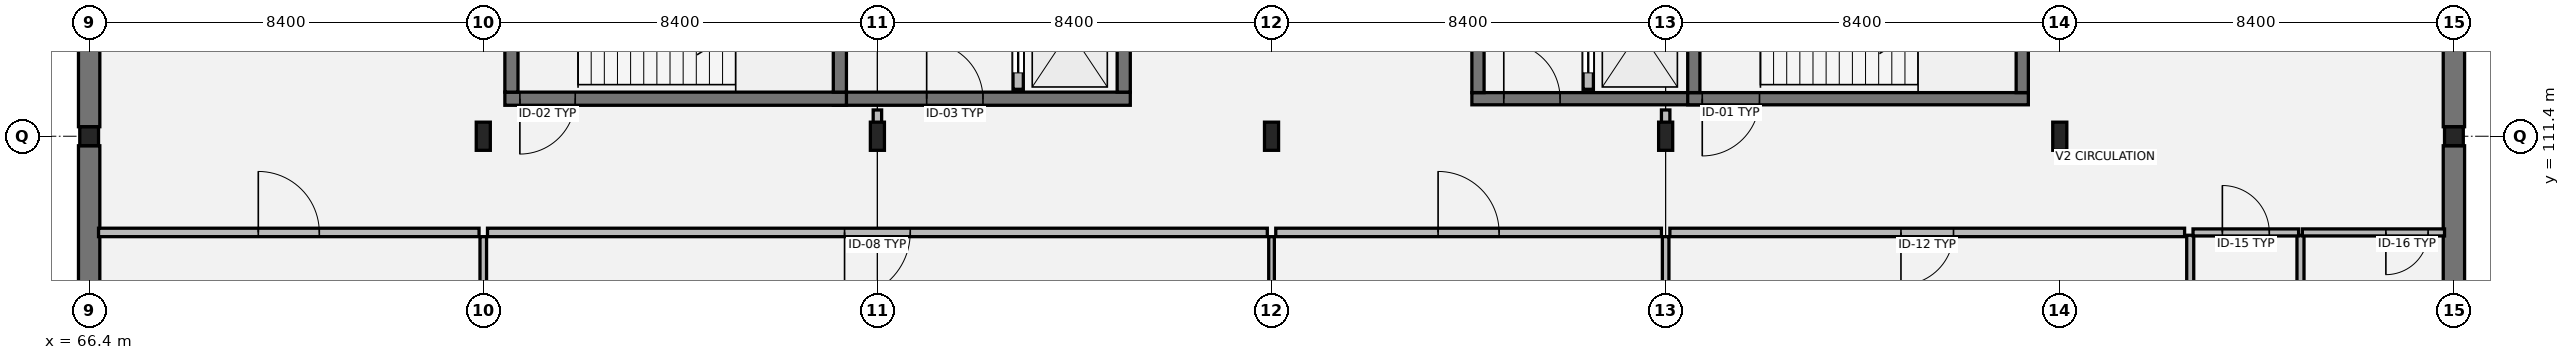
"""IFC4 building model, lengths in metres.
Left out: names, types, materials, properties, quantities, classifications, styles, units other than length and angle.
Written with IfcOpenShell. Run it as: python <this file> out.ifc"""

import sys

from ifc_helpers import new_model, si_unit, direction, frame, frame_2d, origin, origin_2d, place, context, subcontext, project, spatial, rectangle, hollow_rectangle, i_section, extrude, element, fill, save


model = new_model("IFC4")
c1 = context("Model", 3, precision=1e-05, world=origin(), true_north=direction((0.0, 1.0)))
c2 = subcontext(c1, "Body", "Model", "MODEL_VIEW")
j1 = project(units=[si_unit("LENGTHUNIT", "METRE"), si_unit("PLANEANGLEUNIT", "RADIAN")], contexts=[c1])
p1 = place(None, origin())
s1 = spatial("IfcSite", under=j1, at=p1, CompositionType="ELEMENT")
p2 = place(p1, origin())
s2 = spatial("IfcBuilding", under=s1, at=p2, CompositionType="ELEMENT")
p3 = place(p2, frame((0.0, 0.0, -4.42)))
s3 = spatial("IfcBuildingStorey", under=s2, at=p3, CompositionType="ELEMENT", Elevation=-4.42)
p4 = place(p3, frame((66.4, 111.4, 0.0), z_axis=(0.0, 0.0, 1.0), x_axis=(1.0, 0.0, 0.0)))
e1 = element("IfcColumn", 1, at=p4, inside=s3, PredefinedType="COLUMN", context=c2, shape_type="SweptSolid", body=[
    extrude(hollow_rectangle(XDim=0.4, YDim=0.4, WallThickness=0.016, at=origin_2d()), origin(), (0.0, 0.0, 1.0), 4.395),
])
for number, where, z_axis, x_axis in (
    (2, (74.8, 111.4, 0.0), (0.0, 0.0, 1.0), (1.0, 0.0, 0.0)),
    (3, (83.2, 111.4, 0.0), (0.0, 0.0, 1.0), (1.0, 0.0, 0.0)),
    (4, (91.6, 111.4, 0.0), (0.0, 0.0, 1.0), (1.0, 0.0, 0.0)),
    (5, (100.0, 111.4, 0.0), (0.0, 0.0, 1.0), (1.0, 0.0, 0.0)),
    (6, (108.4, 111.4, 0.0), (0.0, 0.0, 1.0), (1.0, 0.0, 0.0)),
):
    element("IfcColumn", number, at=place(p3, frame(where, z_axis=z_axis, x_axis=x_axis)), inside=s3, PredefinedType="COLUMN", context=c2, shape_type="SweptSolid", body=[
        extrude(i_section(OverallWidth=0.3, OverallDepth=0.6, WebThickness=0.015, FlangeThickness=0.03, at=origin_2d()), origin(), (0.0, 0.0, 1.0), 4.395),
    ])
p5 = place(p3, frame((116.8, 111.4, 0.0), z_axis=(0.0, 0.0, 1.0), x_axis=(1.0, 0.0, 0.0)))
e7 = element("IfcColumn", 7, at=p5, inside=s3, PredefinedType="COLUMN", context=c2, shape_type="SweptSolid", body=[
    extrude(hollow_rectangle(XDim=0.4, YDim=0.4, WallThickness=0.016, at=origin_2d()), origin(), (0.0, 0.0, 1.0), 4.395),
])
for number, where, z_axis, x_axis in (
    (8, (66.4, 104.003, 0.0), (0.0, 0.0, 1.0), (0.0, 1.0, 0.0)),
    (9, (116.8, 104.003, 0.0), (0.0, 0.0, 1.0), (0.0, 1.0, 0.0)),
    (10, (66.4, 111.603, 0.0), (0.0, 0.0, 1.0), (0.0, 1.0, 0.0)),
    (11, (116.8, 111.603, 0.0), (0.0, 0.0, 1.0), (0.0, 1.0, 0.0)),
):
    element("IfcWall", number, at=place(p3, frame(where, z_axis=z_axis, x_axis=x_axis)), inside=s3, PredefinedType="USERDEFINED", context=c2, shape_type="SweptSolid", body=[
        extrude(rectangle(XDim=7.194, YDim=0.455, at=frame_2d((3.597, 0.0))), origin(), (0.0, 0.0, 1.0), 3.82),
    ])
p6 = place(p3, frame((82.26, 112.2, 0.0), z_axis=(0.0, 0.0, 1.0), x_axis=(1.0, 0.0, 0.0)))
e12 = element("IfcWall", 12, at=p6, inside=s3, PredefinedType="SHEAR", context=c2, shape_type="SweptSolid", body=[
    extrude(rectangle(XDim=6.33, YDim=0.28, at=frame_2d((3.165, 0.0))), origin(), (0.0, 0.0, 1.0), 4.185),
])
p7 = place(p6, frame((1.99, 0.0, 0.0)))
e13 = element("IfcOpeningElement", 13, at=p7, cuts=e12, PredefinedType="OPENING", context=c2, shape_type="SweptSolid", body=[
    extrude(rectangle(XDim=1.2, YDim=2.16, at=frame_2d((0.6, 1.08))), frame((0.0, 0.15, 0.0), z_axis=(0.0, -1.0, 0.0), x_axis=(1.0, 0.0, 0.0)), (0.0, 0.0, 1.0), 0.3),
])
p8 = place(p3, frame((88.45, 112.34, 0.0), z_axis=(0.0, 0.0, 1.0), x_axis=(0.0, 1.0, 0.0)))
e14 = element("IfcWall", 14, at=p8, inside=s3, PredefinedType="SHEAR", context=c2, shape_type="SweptSolid", body=[
    extrude(rectangle(XDim=5.72, YDim=0.28, at=frame_2d((2.86, 0.0))), origin(), (0.0, 0.0, 1.0), 4.185),
])
p9 = place(p3, frame((86.2, 112.4, 0.0), z_axis=(0.0, 0.0, 1.0), x_axis=(0.0, 1.0, 0.0)))
e15 = element("IfcWall", 15, at=p9, inside=s3, PredefinedType="SOLIDWALL", context=c2, shape_type="SweptSolid", body=[
    extrude(rectangle(XDim=5.6, YDim=0.22, at=frame_2d((2.8, 0.0))), origin(), (0.0, 0.0, 1.0), 4.185),
])
p10 = place(p9, frame((0.35, 0.0, 0.0)))
e16 = element("IfcOpeningElement", 16, at=p10, cuts=e15, PredefinedType="OPENING", context=c2, shape_type="SweptSolid", body=[
    extrude(rectangle(XDim=1.1, YDim=2.15, at=frame_2d((0.55, 1.075))), frame((0.0, 0.12, 0.0), z_axis=(0.0, -1.0, 0.0), x_axis=(1.0, 0.0, 0.0)), (0.0, 0.0, 1.0), 0.24),
])
p11 = place(p9, frame((2.4, 0.0, 0.0)))
e17 = element("IfcOpeningElement", 17, at=p11, cuts=e15, PredefinedType="OPENING", context=c2, shape_type="SweptSolid", body=[
    extrude(rectangle(XDim=1.1, YDim=2.15, at=frame_2d((0.55, 1.075))), frame((0.0, 0.12, 0.0), z_axis=(0.0, -1.0, 0.0), x_axis=(1.0, 0.0, 0.0)), (0.0, 0.0, 1.0), 0.24),
])
p12 = place(p3, frame((75.26, 112.2, 0.0), z_axis=(0.0, 0.0, 1.0), x_axis=(1.0, 0.0, 0.0)))
e18 = element("IfcWall", 18, at=p12, inside=s3, PredefinedType="SHEAR", context=c2, shape_type="SweptSolid", body=[
    extrude(rectangle(XDim=7.28, YDim=0.28, at=frame_2d((3.64, 0.0))), origin(), (0.0, 0.0, 1.0), 4.185),
])
p13 = place(p12, frame((0.32, 0.0, 0.0)))
e19 = element("IfcOpeningElement", 19, at=p13, cuts=e18, PredefinedType="OPENING", context=c2, shape_type="SweptSolid", body=[
    extrude(rectangle(XDim=1.18, YDim=2.18, at=frame_2d((0.59, 1.09))), frame((0.0, 0.15, 0.0), z_axis=(0.0, -1.0, 0.0), x_axis=(1.0, 0.0, 0.0)), (0.0, 0.0, 1.0), 0.3),
])
for number, where, z_axis, x_axis in (
    (20, (75.4, 112.34, 0.0), (0.0, 0.0, 1.0), (0.0, 1.0, 0.0)),
    (21, (82.4, 112.34, 0.0), (0.0, 0.0, 1.0), (0.0, 1.0, 0.0)),
):
    element("IfcWall", number, at=place(p3, frame(where, z_axis=z_axis, x_axis=x_axis)), inside=s3, PredefinedType="SHEAR", context=c2, shape_type="SweptSolid", body=[
        extrude(rectangle(XDim=5.72, YDim=0.28, at=frame_2d((2.86, 0.0))), origin(), (0.0, 0.0, 1.0), 4.185),
    ])
p14 = place(p3, frame((95.87, 112.2, 0.0), z_axis=(0.0, 0.0, 1.0), x_axis=(1.0, 0.0, 0.0)))
e22 = element("IfcWall", 22, at=p14, inside=s3, PredefinedType="SHEAR", context=c2, shape_type="SweptSolid", body=[
    extrude(rectangle(XDim=4.86, YDim=0.26, at=frame_2d((2.43, 0.0))), origin(), (0.0, 0.0, 1.0), 4.185),
])
p15 = place(p14, frame((0.68, 0.0, 0.0)))
e23 = element("IfcOpeningElement", 23, at=p15, cuts=e22, PredefinedType="OPENING", context=c2, shape_type="SweptSolid", body=[
    extrude(rectangle(XDim=1.2, YDim=2.16, at=frame_2d((0.6, 1.08))), frame((0.0, 0.14, 0.0), z_axis=(0.0, -1.0, 0.0), x_axis=(1.0, 0.0, 0.0)), (0.0, 0.0, 1.0), 0.28),
])
p16 = place(p3, frame((96.0, 118.07, 0.0), z_axis=(0.0, 0.0, 1.0), x_axis=(0.0, -1.0, 0.0)))
e24 = element("IfcWall", 24, at=p16, inside=s3, PredefinedType="SHEAR", context=c2, shape_type="SweptSolid", body=[
    extrude(rectangle(XDim=5.74, YDim=0.26, at=frame_2d((2.87, 0.0))), origin(), (0.0, 0.0, 1.0), 4.185),
])
p17 = place(p3, frame((98.35, 112.4, 0.0), z_axis=(0.0, 0.0, 1.0), x_axis=(0.0, 1.0, 0.0)))
e25 = element("IfcWall", 25, at=p17, inside=s3, PredefinedType="SOLIDWALL", context=c2, shape_type="SweptSolid", body=[
    extrude(rectangle(XDim=5.6, YDim=0.22, at=frame_2d((2.8, 0.0))), origin(), (0.0, 0.0, 1.0), 4.185),
])
p18 = place(p17, frame((0.35, 0.0, 0.0)))
e26 = element("IfcOpeningElement", 26, at=p18, cuts=e25, PredefinedType="OPENING", context=c2, shape_type="SweptSolid", body=[
    extrude(rectangle(XDim=1.1, YDim=2.15, at=frame_2d((0.55, 1.075))), frame((0.0, 0.12, 0.0), z_axis=(0.0, -1.0, 0.0), x_axis=(1.0, 0.0, 0.0)), (0.0, 0.0, 1.0), 0.24),
])
p19 = place(p3, frame((100.47, 112.2, 0.0), z_axis=(0.0, 0.0, 1.0), x_axis=(1.0, 0.0, 0.0)))
e27 = element("IfcWall", 27, at=p19, inside=s3, PredefinedType="SHEAR", context=c2, shape_type="SweptSolid", body=[
    extrude(rectangle(XDim=7.26, YDim=0.26, at=frame_2d((3.63, 0.0))), origin(), (0.0, 0.0, 1.0), 4.185),
])
p20 = place(p19, frame((0.31, 0.0, 0.0)))
e28 = element("IfcOpeningElement", 28, at=p20, cuts=e27, PredefinedType="OPENING", context=c2, shape_type="SweptSolid", body=[
    extrude(rectangle(XDim=1.22, YDim=2.18, at=frame_2d((0.61, 1.09))), frame((0.0, 0.14, 0.0), z_axis=(0.0, -1.0, 0.0), x_axis=(1.0, 0.0, 0.0)), (0.0, 0.0, 1.0), 0.28),
])
for number, where, z_axis, x_axis in (
    (29, (100.6, 112.33, 0.0), (0.0, 0.0, 1.0), (0.0, 1.0, 0.0)),
    (30, (107.6, 112.33, 0.0), (0.0, 0.0, 1.0), (0.0, 1.0, 0.0)),
):
    element("IfcWall", number, at=place(p3, frame(where, z_axis=z_axis, x_axis=x_axis)), inside=s3, PredefinedType="SHEAR", context=c2, shape_type="SweptSolid", body=[
        extrude(rectangle(XDim=5.74, YDim=0.26, at=frame_2d((2.87, 0.0))), origin(), (0.0, 0.0, 1.0), 4.185),
    ])
for number, where, z_axis, x_axis in (
    (31, (111.18, 106.93, 0.0), (0.0, 0.0, 1.0), (0.0, 1.0, 0.0)),
    (32, (113.53, 106.93, 0.0), (0.0, 0.0, 1.0), (0.0, 1.0, 0.0)),
):
    element("IfcWall", number, at=place(p3, frame(where, z_axis=z_axis, x_axis=x_axis)), inside=s3, PredefinedType="PARTITIONING", context=c2, shape_type="SweptSolid", body=[
        extrude(rectangle(XDim=2.36, YDim=0.15, at=frame_2d((1.18, 0.0))), origin(), (0.0, 0.0, 1.0), 3.52),
    ])
p21 = place(p3, frame((111.24, 109.35, 0.0), z_axis=(0.0, 0.0, 1.0), x_axis=(1.0, 0.0, 0.0)))
e33 = element("IfcWall", 33, at=p21, inside=s3, PredefinedType="PARTITIONING", context=c2, shape_type="SweptSolid", body=[
    extrude(rectangle(XDim=2.25, YDim=0.15, at=frame_2d((1.125, 0.0))), origin(), (0.0, 0.0, 1.0), 3.52),
])
p22 = place(p21, frame((0.625, 0.0, 0.0)))
e34 = element("IfcOpeningElement", 34, at=p22, cuts=e33, PredefinedType="OPENING", context=c2, shape_type="SweptSolid", body=[
    extrude(rectangle(XDim=1.0, YDim=2.15, at=frame_2d((0.5, 1.075))), frame((0.0, 0.085, 0.0), z_axis=(0.0, -1.0, 0.0), x_axis=(1.0, 0.0, 0.0)), (0.0, 0.0, 1.0), 0.17),
])
p23 = place(p3, frame((113.57, 109.35, 0.0), z_axis=(0.0, 0.0, 1.0), x_axis=(1.0, 0.0, 0.0)))
e35 = element("IfcWall", 35, at=p23, inside=s3, PredefinedType="PARTITIONING", context=c2, shape_type="SweptSolid", body=[
    extrude(rectangle(XDim=3.03, YDim=0.15, at=frame_2d((1.515, 0.0))), origin(), (0.0, 0.0, 1.0), 3.52),
])
p24 = place(p23, frame((1.78, 0.0, 0.0)))
e36 = element("IfcOpeningElement", 36, at=p24, cuts=e35, PredefinedType="OPENING", context=c2, shape_type="SweptSolid", body=[
    extrude(rectangle(XDim=0.9, YDim=2.15, at=frame_2d((0.45, 1.075))), frame((0.0, 0.085, 0.0), z_axis=(0.0, -1.0, 0.0), x_axis=(1.0, 0.0, 0.0)), (0.0, 0.0, 1.0), 0.17),
])
p25 = place(p3, frame((66.6, 109.35, 0.0), z_axis=(0.0, 0.0, 1.0), x_axis=(1.0, 0.0, 0.0)))
e37 = element("IfcWall", 37, at=p25, inside=s3, PredefinedType="PARTITIONING", context=c2, shape_type="SweptSolid", body=[
    extrude(rectangle(XDim=8.11, YDim=0.18, at=frame_2d((4.055, 0.0))), origin(), (0.0, 0.0, 1.0), 3.52),
])
p26 = place(p25, frame((3.405, 0.0, 0.0)))
e38 = element("IfcOpeningElement", 38, at=p26, cuts=e37, PredefinedType="OPENING", context=c2, shape_type="SweptSolid", body=[
    extrude(rectangle(XDim=1.3, YDim=2.2, at=frame_2d((0.65, 1.1))), frame((0.0, 0.1, 0.0), z_axis=(0.0, -1.0, 0.0), x_axis=(1.0, 0.0, 0.0)), (0.0, 0.0, 1.0), 0.2),
])
p27 = place(p3, frame((74.89, 109.35, 0.0), z_axis=(0.0, 0.0, 1.0), x_axis=(1.0, 0.0, 0.0)))
e39 = element("IfcWall", 39, at=p27, inside=s3, PredefinedType="PARTITIONING", context=c2, shape_type="SweptSolid", body=[
    extrude(rectangle(XDim=16.62, YDim=0.18, at=frame_2d((8.31, 0.0))), origin(), (0.0, 0.0, 1.0), 3.52),
])
p28 = place(p27, frame((7.61, 0.0, 0.0)))
e40 = element("IfcOpeningElement", 40, at=p28, cuts=e39, PredefinedType="OPENING", context=c2, shape_type="SweptSolid", body=[
    extrude(rectangle(XDim=1.4, YDim=2.22, at=frame_2d((0.7, 1.11))), frame((0.0, 0.1, 0.0), z_axis=(0.0, -1.0, 0.0), x_axis=(1.0, 0.0, 0.0)), (0.0, 0.0, 1.0), 0.2),
])
p29 = place(p3, frame((91.69, 109.35, 0.0), z_axis=(0.0, 0.0, 1.0), x_axis=(1.0, 0.0, 0.0)))
e41 = element("IfcWall", 41, at=p29, inside=s3, PredefinedType="PARTITIONING", context=c2, shape_type="SweptSolid", body=[
    extrude(rectangle(XDim=8.22, YDim=0.18, at=frame_2d((4.11, 0.0))), origin(), (0.0, 0.0, 1.0), 3.52),
])
p30 = place(p29, frame((3.46, 0.0, 0.0)))
e42 = element("IfcOpeningElement", 42, at=p30, cuts=e41, PredefinedType="OPENING", context=c2, shape_type="SweptSolid", body=[
    extrude(rectangle(XDim=1.3, YDim=2.2, at=frame_2d((0.65, 1.1))), frame((0.0, 0.1, 0.0), z_axis=(0.0, -1.0, 0.0), x_axis=(1.0, 0.0, 0.0)), (0.0, 0.0, 1.0), 0.2),
])
p31 = place(p3, frame((100.09, 109.35, 0.0), z_axis=(0.0, 0.0, 1.0), x_axis=(1.0, 0.0, 0.0)))
e43 = element("IfcWall", 43, at=p31, inside=s3, PredefinedType="PARTITIONING", context=c2, shape_type="SweptSolid", body=[
    extrude(rectangle(XDim=10.97, YDim=0.18, at=frame_2d((5.485, 0.0))), origin(), (0.0, 0.0, 1.0), 3.52),
])
p32 = place(p31, frame((4.925, 0.0, 0.0)))
e44 = element("IfcOpeningElement", 44, at=p32, cuts=e43, PredefinedType="OPENING", context=c2, shape_type="SweptSolid", body=[
    extrude(rectangle(XDim=1.12, YDim=2.15, at=frame_2d((0.56, 1.075))), frame((0.0, 0.1, 0.0), z_axis=(0.0, -1.0, 0.0), x_axis=(1.0, 0.0, 0.0)), (0.0, 0.0, 1.0), 0.2),
])
for number, where, z_axis, x_axis in (
    (45, (83.2, 111.64, 0.0), (0.0, 0.0, 1.0), (0.0, 1.0, 0.0)),
    (46, (100.0, 111.64, 0.0), (0.0, 0.0, 1.0), (0.0, 1.0, 0.0)),
):
    element("IfcWall", number, at=place(p3, frame(where, z_axis=z_axis, x_axis=x_axis)), inside=s3, PredefinedType="PARTITIONING", context=c2, shape_type="SweptSolid", body=[
        extrude(rectangle(XDim=0.32, YDim=0.18, at=frame_2d((0.16, 0.0))), origin(), (0.0, 0.0, 1.0), 3.52),
    ])
p33 = place(p3, frame((74.8, 81.32, 0.0), z_axis=(0.0, 0.0, 1.0), x_axis=(0.0, 1.0, 0.0)))
e47 = element("IfcWall", 47, at=p33, inside=s3, PredefinedType="PARTITIONING", context=c2, shape_type="SweptSolid", body=[
    extrude(rectangle(XDim=27.94, YDim=0.14, at=frame_2d((13.97, 0.0))), origin(), (0.0, 0.0, 1.0), 3.52),
])
p34 = place(p3, frame((91.6, 81.32, 0.0), z_axis=(0.0, 0.0, 1.0), x_axis=(0.0, 1.0, 0.0)))
e48 = element("IfcWall", 48, at=p34, inside=s3, PredefinedType="PARTITIONING", context=c2, shape_type="SweptSolid", body=[
    extrude(rectangle(XDim=27.94, YDim=0.12, at=frame_2d((13.97, 0.0))), origin(), (0.0, 0.0, 1.0), 3.52),
])
p35 = place(p3, frame((100.0, 81.32, 0.0), z_axis=(0.0, 0.0, 1.0), x_axis=(0.0, 1.0, 0.0)))
e49 = element("IfcWall", 49, at=p35, inside=s3, PredefinedType="PARTITIONING", context=c2, shape_type="SweptSolid", body=[
    extrude(rectangle(XDim=27.94, YDim=0.14, at=frame_2d((13.97, 0.0))), origin(), (0.0, 0.0, 1.0), 3.52),
])
p36 = place(p7, origin())
e50 = element("IfcDoor", 50, at=p36, inside=s3, OperationType="SINGLE_SWING_LEFT", PredefinedType="DOOR", context=c2, shape_type="SweptSolid", body=[
    extrude(rectangle(XDim=1.2, YDim=2.16, at=frame_2d((0.6, 1.08))), frame((0.0, 0.025, 0.0), z_axis=(0.0, -1.0, 0.0), x_axis=(1.0, 0.0, 0.0)), (0.0, 0.0, 1.0), 0.05),
])
fill(e13, e50)
p37 = place(p10, origin())
e51 = element("IfcDoor", 51, at=p37, inside=s3, OperationType="SLIDING_TO_LEFT", PredefinedType="DOOR", context=c2, shape_type="SweptSolid", body=[
    extrude(rectangle(XDim=1.1, YDim=2.15, at=frame_2d((0.55, 1.075))), frame((0.0, 0.025, 0.0), z_axis=(0.0, -1.0, 0.0), x_axis=(1.0, 0.0, 0.0)), (0.0, 0.0, 1.0), 0.05),
])
fill(e16, e51)
p38 = place(p13, origin())
e52 = element("IfcDoor", 52, at=p38, inside=s3, OperationType="SINGLE_SWING_RIGHT", PredefinedType="DOOR", context=c2, shape_type="SweptSolid", body=[
    extrude(rectangle(XDim=1.18, YDim=2.18, at=frame_2d((0.59, 1.09))), frame((0.0, 0.025, 0.0), z_axis=(0.0, -1.0, 0.0), x_axis=(1.0, 0.0, 0.0)), (0.0, 0.0, 1.0), 0.05),
])
fill(e19, e52)
p39 = place(p15, origin())
e53 = element("IfcDoor", 53, at=p39, inside=s3, OperationType="SINGLE_SWING_LEFT", PredefinedType="DOOR", context=c2, shape_type="SweptSolid", body=[
    extrude(rectangle(XDim=1.2, YDim=2.16, at=frame_2d((0.6, 1.08))), frame((0.0, 0.025, 0.0), z_axis=(0.0, -1.0, 0.0), x_axis=(1.0, 0.0, 0.0)), (0.0, 0.0, 1.0), 0.05),
])
fill(e23, e53)
p40 = place(p18, origin())
e54 = element("IfcDoor", 54, at=p40, inside=s3, OperationType="SLIDING_TO_LEFT", PredefinedType="DOOR", context=c2, shape_type="SweptSolid", body=[
    extrude(rectangle(XDim=1.1, YDim=2.15, at=frame_2d((0.55, 1.075))), frame((0.0, 0.025, 0.0), z_axis=(0.0, -1.0, 0.0), x_axis=(1.0, 0.0, 0.0)), (0.0, 0.0, 1.0), 0.05),
])
fill(e26, e54)
p41 = place(p20, origin())
e55 = element("IfcDoor", 55, at=p41, inside=s3, OperationType="SINGLE_SWING_RIGHT", PredefinedType="DOOR", context=c2, shape_type="SweptSolid", body=[
    extrude(rectangle(XDim=1.22, YDim=2.18, at=frame_2d((0.61, 1.09))), frame((0.0, 0.025, 0.0), z_axis=(0.0, -1.0, 0.0), x_axis=(1.0, 0.0, 0.0)), (0.0, 0.0, 1.0), 0.05),
])
fill(e28, e55)
p42 = place(p22, origin())
e56 = element("IfcDoor", 56, at=p42, inside=s3, OperationType="SINGLE_SWING_LEFT", PredefinedType="DOOR", context=c2, shape_type="SweptSolid", body=[
    extrude(rectangle(XDim=1.0, YDim=2.15, at=frame_2d((0.5, 1.075))), frame((0.0, 0.025, 0.0), z_axis=(0.0, -1.0, 0.0), x_axis=(1.0, 0.0, 0.0)), (0.0, 0.0, 1.0), 0.05),
])
fill(e34, e56)
p43 = place(p24, origin())
e57 = element("IfcDoor", 57, at=p43, inside=s3, OperationType="SINGLE_SWING_RIGHT", PredefinedType="DOOR", context=c2, shape_type="SweptSolid", body=[
    extrude(rectangle(XDim=0.9, YDim=2.15, at=frame_2d((0.45, 1.075))), frame((0.0, 0.025, 0.0), z_axis=(0.0, -1.0, 0.0), x_axis=(1.0, 0.0, 0.0)), (0.0, 0.0, 1.0), 0.05),
])
fill(e36, e57)
p44 = place(p26, origin())
e58 = element("IfcDoor", 58, at=p44, inside=s3, OperationType="SINGLE_SWING_LEFT", PredefinedType="DOOR", context=c2, shape_type="SweptSolid", body=[
    extrude(rectangle(XDim=1.3, YDim=2.2, at=frame_2d((0.65, 1.1))), frame((0.0, 0.025, 0.0), z_axis=(0.0, -1.0, 0.0), x_axis=(1.0, 0.0, 0.0)), (0.0, 0.0, 1.0), 0.05),
])
fill(e38, e58)
p45 = place(p28, origin())
e59 = element("IfcDoor", 59, at=p45, inside=s3, OperationType="SINGLE_SWING_RIGHT", PredefinedType="DOOR", context=c2, shape_type="SweptSolid", body=[
    extrude(rectangle(XDim=1.4, YDim=2.22, at=frame_2d((0.7, 1.11))), frame((0.0, 0.025, 0.0), z_axis=(0.0, -1.0, 0.0), x_axis=(1.0, 0.0, 0.0)), (0.0, 0.0, 1.0), 0.05),
])
fill(e40, e59)
p46 = place(p30, origin())
e60 = element("IfcDoor", 60, at=p46, inside=s3, OperationType="SINGLE_SWING_LEFT", PredefinedType="DOOR", context=c2, shape_type="SweptSolid", body=[
    extrude(rectangle(XDim=1.3, YDim=2.2, at=frame_2d((0.65, 1.1))), frame((0.0, 0.025, 0.0), z_axis=(0.0, -1.0, 0.0), x_axis=(1.0, 0.0, 0.0)), (0.0, 0.0, 1.0), 0.05),
])
fill(e42, e60)
p47 = place(p32, origin())
e61 = element("IfcDoor", 61, at=p47, inside=s3, OperationType="SINGLE_SWING_RIGHT", PredefinedType="DOOR", context=c2, shape_type="SweptSolid", body=[
    extrude(rectangle(XDim=1.12, YDim=2.15, at=frame_2d((0.56, 1.075))), frame((0.0, 0.025, 0.0), z_axis=(0.0, -1.0, 0.0), x_axis=(1.0, 0.0, 0.0)), (0.0, 0.0, 1.0), 0.05),
])
fill(e44, e61)
save(model, sys.argv[1])
